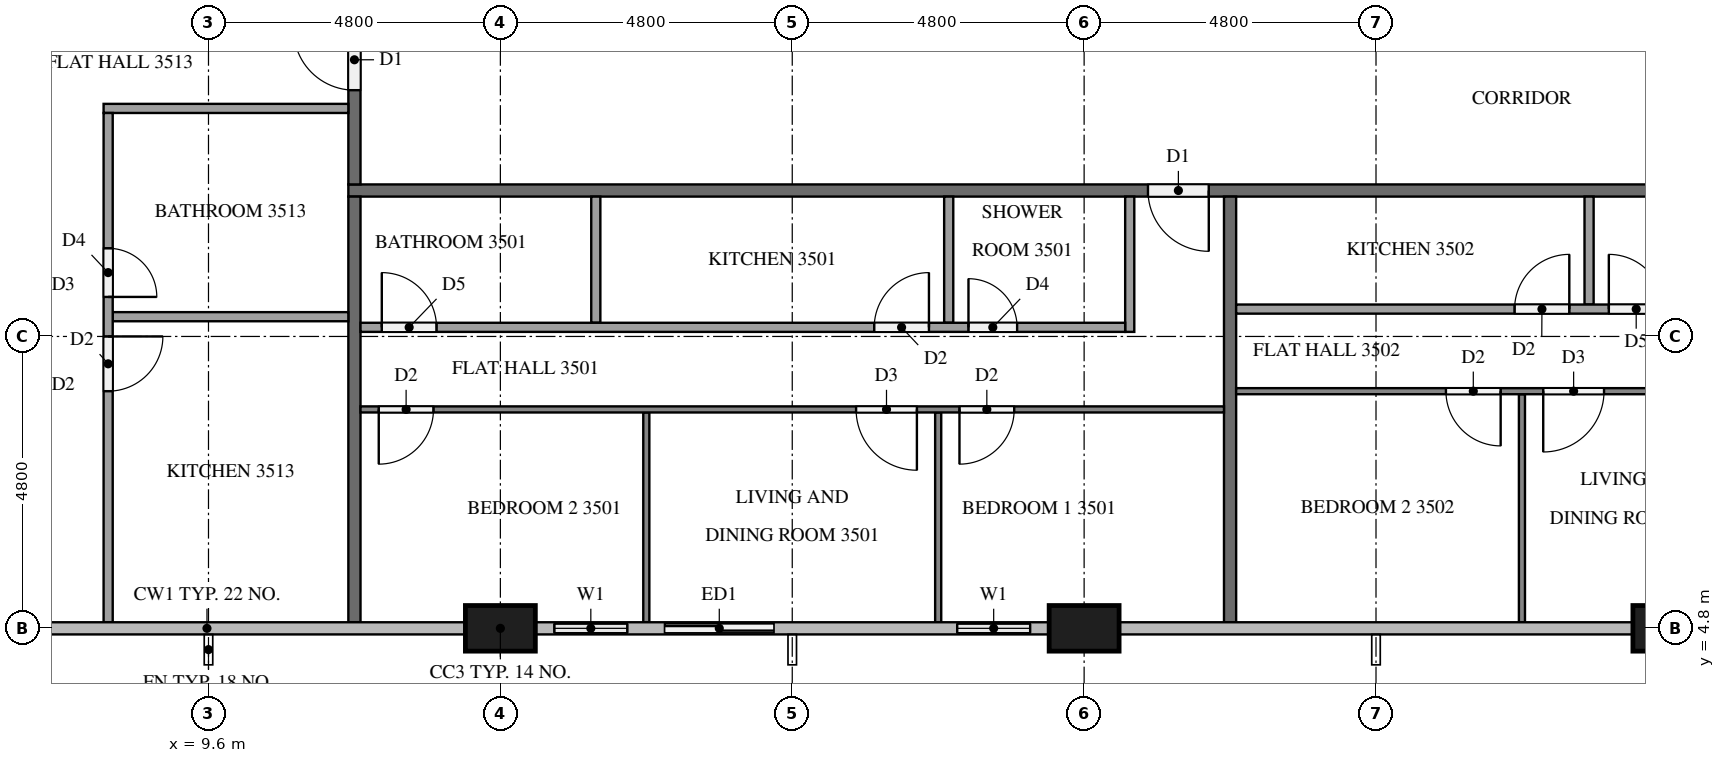
"""IFC4 building model, lengths in metres.
Left out: names, types, materials, properties, quantities, classifications, styles, units other than length and angle.
Written with IfcOpenShell. Run it as: python <this file> out.ifc"""

import sys

from ifc_helpers import new_model, si_unit, direction, frame, frame_2d, origin, origin_2d, place, context, subcontext, project, spatial, rectangle, extrude, element, fill, save


model = new_model("IFC4")
c1 = context("Model", 3, precision=1e-05, world=origin(), true_north=direction((0.0, 1.0)))
c2 = subcontext(c1, "Body", "Model", "MODEL_VIEW")
j1 = project(units=[si_unit("LENGTHUNIT", "METRE"), si_unit("PLANEANGLEUNIT", "RADIAN")], contexts=[c1])
p1 = place(None, origin())
s1 = spatial("IfcSite", under=j1, at=p1, CompositionType="ELEMENT")
p2 = place(p1, origin())
s2 = spatial("IfcBuilding", under=s1, at=p2, CompositionType="ELEMENT")
p3 = place(p2, frame((0.0, 0.0, 136.6)))
s3 = spatial("IfcBuildingStorey", under=s2, at=p3, CompositionType="ELEMENT", Elevation=136.6)
for number, where, z_axis, x_axis in (
    (1, (14.4, 4.8, 0.0), (0.0, 0.0, 1.0), (1.0, 0.0, 0.0)),
    (2, (24.0, 4.8, 0.0), (0.0, 0.0, 1.0), (1.0, 0.0, 0.0)),
    (3, (33.6, 4.8, 0.0), (0.0, 0.0, 1.0), (1.0, 0.0, 0.0)),
):
    element("IfcColumn", number, at=place(p3, frame(where, z_axis=z_axis, x_axis=x_axis)), inside=s3, PredefinedType="COLUMN", context=c2, shape_type="SweptSolid", body=[
        extrude(rectangle(XDim=1.15, YDim=0.75, at=origin_2d()), origin(), (0.0, 0.0, 1.0), 3.2),
    ])
p4 = place(p3, frame((14.975, 4.8, 0.0), z_axis=(0.0, 0.0, 1.0), x_axis=(1.0, 0.0, 0.0)))
e4 = element("IfcWall", 4, at=p4, inside=s3, PredefinedType="SOLIDWALL", context=c2, shape_type="SweptSolid", body=[
    extrude(rectangle(XDim=4.225, YDim=0.15, at=frame_2d((2.112, 0.0))), origin(), (0.0, 0.0, 1.0), 3.2),
])
p5 = place(p4, frame((0.312, 0.0, 0.9)))
e5 = element("IfcOpeningElement", 5, at=p5, cuts=e4, PredefinedType="OPENING", context=c2, shape_type="SweptSolid", body=[
    extrude(rectangle(XDim=1.2, YDim=1.4, at=frame_2d((0.6, 0.7))), frame((0.0, 0.085, 0.0), z_axis=(0.0, -1.0, 0.0), x_axis=(1.0, 0.0, 0.0)), (0.0, 0.0, 1.0), 0.17),
])
p6 = place(p4, frame((2.125, 0.0, 0.0)))
e6 = element("IfcOpeningElement", 6, at=p6, cuts=e4, PredefinedType="OPENING", context=c2, shape_type="SweptSolid", body=[
    extrude(rectangle(XDim=1.8, YDim=2.4, at=frame_2d((0.9, 1.2))), frame((0.0, 0.085, 0.0), z_axis=(0.0, -1.0, 0.0), x_axis=(1.0, 0.0, 0.0)), (0.0, 0.0, 1.0), 0.17),
])
p7 = place(p3, frame((21.6, 4.8, 0.0), z_axis=(0.0, 0.0, 1.0), x_axis=(1.0, 0.0, 0.0)))
e7 = element("IfcWall", 7, at=p7, inside=s3, PredefinedType="SOLIDWALL", context=c2, shape_type="SweptSolid", body=[
    extrude(rectangle(XDim=1.825, YDim=0.15, at=frame_2d((0.913, 0.0))), origin(), (0.0, 0.0, 1.0), 3.2),
])
p8 = place(p7, frame((0.312, 0.0, 0.9)))
e8 = element("IfcOpeningElement", 8, at=p8, cuts=e7, PredefinedType="OPENING", context=c2, shape_type="SweptSolid", body=[
    extrude(rectangle(XDim=1.2, YDim=1.4, at=frame_2d((0.6, 0.7))), frame((0.0, 0.085, 0.0), z_axis=(0.0, -1.0, 0.0), x_axis=(1.0, 0.0, 0.0)), (0.0, 0.0, 1.0), 0.17),
])
p9 = place(p3, frame((50.5, 12.0, 0.0), z_axis=(0.0, 0.0, 1.0), x_axis=(-1.0, 0.0, 0.0)))
e9 = element("IfcWall", 9, at=p9, inside=s3, PredefinedType="PARTITIONING", context=c2, shape_type="SweptSolid", body=[
    extrude(rectangle(XDim=38.6, YDim=0.2, at=frame_2d((19.3, 0.0))), origin(), (0.0, 0.0, 1.0), 3.2),
])
p10 = place(p9, frame((24.45, 0.0, 0.0)))
e10 = element("IfcOpeningElement", 10, at=p10, cuts=e9, PredefinedType="OPENING", context=c2, shape_type="SweptSolid", body=[
    extrude(rectangle(XDim=1.0, YDim=2.1, at=frame_2d((0.5, 1.05))), frame((0.0, 0.11, 0.0), z_axis=(0.0, -1.0, 0.0), x_axis=(1.0, 0.0, 0.0)), (0.0, 0.0, 1.0), 0.22),
])
p11 = place(p9, frame((10.05, 0.0, 0.0)))
e11 = element("IfcOpeningElement", 11, at=p11, cuts=e9, PredefinedType="OPENING", context=c2, shape_type="SweptSolid", body=[
    extrude(rectangle(XDim=1.0, YDim=2.1, at=frame_2d((0.5, 1.05))), frame((0.0, 0.11, 0.0), z_axis=(0.0, -1.0, 0.0), x_axis=(1.0, 0.0, 0.0)), (0.0, 0.0, 1.0), 0.22),
])
p12 = place(p9, frame((8.35, 0.0, 0.0)))
e12 = element("IfcOpeningElement", 12, at=p12, cuts=e9, PredefinedType="OPENING", context=c2, shape_type="SweptSolid", body=[
    extrude(rectangle(XDim=1.0, YDim=2.1, at=frame_2d((0.5, 1.05))), frame((0.0, 0.11, 0.0), z_axis=(0.0, -1.0, 0.0), x_axis=(1.0, 0.0, 0.0)), (0.0, 0.0, 1.0), 0.22),
])
p13 = place(p3, frame((12.0, 12.1, 0.0), z_axis=(0.0, 0.0, 1.0), x_axis=(0.0, 1.0, 0.0)))
e13 = element("IfcWall", 13, at=p13, inside=s3, PredefinedType="PARTITIONING", context=c2, shape_type="SweptSolid", body=[
    extrude(rectangle(XDim=2.8, YDim=0.2, at=frame_2d((1.4, 0.0))), origin(), (0.0, 0.0, 1.0), 3.2),
])
p14 = place(p13, frame((1.55, 0.0, 0.0)))
e14 = element("IfcOpeningElement", 14, at=p14, cuts=e13, PredefinedType="OPENING", context=c2, shape_type="SweptSolid", body=[
    extrude(rectangle(XDim=1.0, YDim=2.1, at=frame_2d((0.5, 1.05))), frame((0.0, 0.11, 0.0), z_axis=(0.0, -1.0, 0.0), x_axis=(1.0, 0.0, 0.0)), (0.0, 0.0, 1.0), 0.22),
])
for number, where, z_axis, x_axis in (
    (15, (26.4, 11.9, 0.0), (0.0, 0.0, 1.0), (0.0, -1.0, 0.0)),
    (16, (12.0, 4.9, 0.0), (0.0, 0.0, 1.0), (0.0, 1.0, 0.0)),
):
    element("IfcWall", number, at=place(p3, frame(where, z_axis=z_axis, x_axis=x_axis)), inside=s3, PredefinedType="PARTITIONING", context=c2, shape_type="SweptSolid", body=[
        extrude(rectangle(XDim=7.0, YDim=0.2, at=frame_2d((3.5, 0.0))), origin(), (0.0, 0.0, 1.0), 3.2),
    ])
for number, where, z_axis, x_axis in (
    (17, (21.6, 8.35, 0.0), (0.0, 0.0, 1.0), (0.0, -1.0, 0.0)),
    (18, (16.8, 8.35, 0.0), (0.0, 0.0, 1.0), (0.0, -1.0, 0.0)),
):
    element("IfcWall", number, at=place(p3, frame(where, z_axis=z_axis, x_axis=x_axis)), inside=s3, PredefinedType="PARTITIONING", context=c2, shape_type="SweptSolid", body=[
        extrude(rectangle(XDim=3.45, YDim=0.1, at=frame_2d((1.725, 0.0))), origin(), (0.0, 0.0, 1.0), 3.2),
    ])
p15 = place(p3, frame((26.3, 8.4, 0.0), z_axis=(0.0, 0.0, 1.0), x_axis=(-1.0, 0.0, 0.0)))
e19 = element("IfcWall", 19, at=p15, inside=s3, PredefinedType="PARTITIONING", context=c2, shape_type="SweptSolid", body=[
    extrude(rectangle(XDim=14.2, YDim=0.1, at=frame_2d((7.1, 0.0))), origin(), (0.0, 0.0, 1.0), 3.2),
])
p16 = place(p15, frame((3.45, 0.0, 0.0)))
e20 = element("IfcOpeningElement", 20, at=p16, cuts=e19, PredefinedType="OPENING", context=c2, shape_type="SweptSolid", body=[
    extrude(rectangle(XDim=0.9, YDim=2.1, at=frame_2d((0.45, 1.05))), frame((0.0, 0.06, 0.0), z_axis=(0.0, -1.0, 0.0), x_axis=(1.0, 0.0, 0.0)), (0.0, 0.0, 1.0), 0.12),
])
p17 = place(p15, frame((5.05, 0.0, 0.0)))
e21 = element("IfcOpeningElement", 21, at=p17, cuts=e19, PredefinedType="OPENING", context=c2, shape_type="SweptSolid", body=[
    extrude(rectangle(XDim=1.0, YDim=2.1, at=frame_2d((0.5, 1.05))), frame((0.0, 0.06, 0.0), z_axis=(0.0, -1.0, 0.0), x_axis=(1.0, 0.0, 0.0)), (0.0, 0.0, 1.0), 0.12),
])
p18 = place(p15, frame((13.0, 0.0, 0.0)))
e22 = element("IfcOpeningElement", 22, at=p18, cuts=e19, PredefinedType="OPENING", context=c2, shape_type="SweptSolid", body=[
    extrude(rectangle(XDim=0.9, YDim=2.1, at=frame_2d((0.45, 1.05))), frame((0.0, 0.06, 0.0), z_axis=(0.0, -1.0, 0.0), x_axis=(1.0, 0.0, 0.0)), (0.0, 0.0, 1.0), 0.12),
])
for number, where, z_axis, x_axis in (
    (23, (21.773, 11.9, 0.0), (0.0, 0.0, 1.0), (0.0, -1.0, 0.0)),
    (24, (15.969, 11.9, 0.0), (0.0, 0.0, 1.0), (0.0, -1.0, 0.0)),
):
    element("IfcWall", number, at=place(p3, frame(where, z_axis=z_axis, x_axis=x_axis)), inside=s3, PredefinedType="PARTITIONING", context=c2, shape_type="SweptSolid", body=[
        extrude(rectangle(XDim=2.075, YDim=0.15, at=frame_2d((1.038, 0.0))), origin(), (0.0, 0.0, 1.0), 3.2),
    ])
p19 = place(p3, frame((24.75, 11.9, 0.0), z_axis=(0.0, 0.0, 1.0), x_axis=(0.0, -1.0, 0.0)))
e25 = element("IfcWall", 25, at=p19, inside=s3, PredefinedType="PARTITIONING", context=c2, shape_type="SweptSolid", body=[
    extrude(rectangle(XDim=2.225, YDim=0.15, at=frame_2d((1.112, 0.0))), origin(), (0.0, 0.0, 1.0), 3.2),
])
p20 = place(p3, frame((12.1, 9.75, 0.0), z_axis=(0.0, 0.0, 1.0), x_axis=(1.0, 0.0, 0.0)))
e26 = element("IfcWall", 26, at=p20, inside=s3, PredefinedType="PARTITIONING", context=c2, shape_type="SweptSolid", body=[
    extrude(rectangle(XDim=12.575, YDim=0.15, at=frame_2d((6.288, 0.0))), origin(), (0.0, 0.0, 1.0), 3.2),
])
p21 = place(p20, frame((9.998, 0.0, 0.0)))
e27 = element("IfcOpeningElement", 27, at=p21, cuts=e26, PredefinedType="OPENING", context=c2, shape_type="SweptSolid", body=[
    extrude(rectangle(XDim=0.8, YDim=2.1, at=frame_2d((0.4, 1.05))), frame((0.0, 0.085, 0.0), z_axis=(0.0, -1.0, 0.0), x_axis=(1.0, 0.0, 0.0)), (0.0, 0.0, 1.0), 0.17),
])
p22 = place(p20, frame((8.448, 0.0, 0.0)))
e28 = element("IfcOpeningElement", 28, at=p22, cuts=e26, PredefinedType="OPENING", context=c2, shape_type="SweptSolid", body=[
    extrude(rectangle(XDim=0.9, YDim=2.1, at=frame_2d((0.45, 1.05))), frame((0.0, 0.085, 0.0), z_axis=(0.0, -1.0, 0.0), x_axis=(1.0, 0.0, 0.0)), (0.0, 0.0, 1.0), 0.17),
])
p23 = place(p20, frame((0.35, 0.0, 0.0)))
e29 = element("IfcOpeningElement", 29, at=p23, cuts=e26, PredefinedType="OPENING", context=c2, shape_type="SweptSolid", body=[
    extrude(rectangle(XDim=0.9, YDim=2.1, at=frame_2d((0.45, 1.05))), frame((0.0, 0.085, 0.0), z_axis=(0.0, -1.0, 0.0), x_axis=(1.0, 0.0, 0.0)), (0.0, 0.0, 1.0), 0.17),
])
p24 = place(p3, frame((31.2, 8.65, 0.0), z_axis=(0.0, 0.0, 1.0), x_axis=(0.0, -1.0, 0.0)))
e30 = element("IfcWall", 30, at=p24, inside=s3, PredefinedType="PARTITIONING", context=c2, shape_type="SweptSolid", body=[
    extrude(rectangle(XDim=3.75, YDim=0.1, at=frame_2d((1.875, 0.0))), origin(), (0.0, 0.0, 1.0), 3.2),
])
p25 = place(p3, frame((40.7, 8.7, 0.0), z_axis=(0.0, 0.0, 1.0), x_axis=(-1.0, 0.0, 0.0)))
e31 = element("IfcWall", 31, at=p25, inside=s3, PredefinedType="PARTITIONING", context=c2, shape_type="SweptSolid", body=[
    extrude(rectangle(XDim=14.2, YDim=0.1, at=frame_2d((7.1, 0.0))), origin(), (0.0, 0.0, 1.0), 3.2),
])
p26 = place(p25, frame((0.3, 0.0, 0.0)))
e32 = element("IfcOpeningElement", 32, at=p26, cuts=e31, PredefinedType="OPENING", context=c2, shape_type="SweptSolid", body=[
    extrude(rectangle(XDim=0.9, YDim=2.1, at=frame_2d((0.45, 1.05))), frame((0.0, 0.06, 0.0), z_axis=(0.0, -1.0, 0.0), x_axis=(1.0, 0.0, 0.0)), (0.0, 0.0, 1.0), 0.12),
])
p27 = place(p25, frame((8.15, 0.0, 0.0)))
e33 = element("IfcOpeningElement", 33, at=p27, cuts=e31, PredefinedType="OPENING", context=c2, shape_type="SweptSolid", body=[
    extrude(rectangle(XDim=1.0, YDim=2.1, at=frame_2d((0.5, 1.05))), frame((0.0, 0.06, 0.0), z_axis=(0.0, -1.0, 0.0), x_axis=(1.0, 0.0, 0.0)), (0.0, 0.0, 1.0), 0.12),
])
p28 = place(p25, frame((9.85, 0.0, 0.0)))
e34 = element("IfcOpeningElement", 34, at=p28, cuts=e31, PredefinedType="OPENING", context=c2, shape_type="SweptSolid", body=[
    extrude(rectangle(XDim=0.9, YDim=2.1, at=frame_2d((0.45, 1.05))), frame((0.0, 0.06, 0.0), z_axis=(0.0, -1.0, 0.0), x_axis=(1.0, 0.0, 0.0)), (0.0, 0.0, 1.0), 0.12),
])
p29 = place(p3, frame((32.304, 11.9, 0.0), z_axis=(0.0, 0.0, 1.0), x_axis=(0.0, -1.0, 0.0)))
e35 = element("IfcWall", 35, at=p29, inside=s3, PredefinedType="PARTITIONING", context=c2, shape_type="SweptSolid", body=[
    extrude(rectangle(XDim=1.775, YDim=0.15, at=frame_2d((0.887, 0.0))), origin(), (0.0, 0.0, 1.0), 3.2),
])
p30 = place(p3, frame((26.5, 10.05, 0.0), z_axis=(0.0, 0.0, 1.0), x_axis=(1.0, 0.0, 0.0)))
e36 = element("IfcWall", 36, at=p30, inside=s3, PredefinedType="PARTITIONING", context=c2, shape_type="SweptSolid", body=[
    extrude(rectangle(XDim=12.575, YDim=0.15, at=frame_2d((6.288, 0.0))), origin(), (0.0, 0.0, 1.0), 3.2),
])
p31 = place(p30, frame((11.475, 0.0, 0.0)))
e37 = element("IfcOpeningElement", 37, at=p31, cuts=e36, PredefinedType="OPENING", context=c2, shape_type="SweptSolid", body=[
    extrude(rectangle(XDim=0.8, YDim=2.1, at=frame_2d((0.4, 1.05))), frame((0.0, 0.085, 0.0), z_axis=(0.0, -1.0, 0.0), x_axis=(1.0, 0.0, 0.0)), (0.0, 0.0, 1.0), 0.17),
])
p32 = place(p30, frame((6.129, 0.0, 0.0)))
e38 = element("IfcOpeningElement", 38, at=p32, cuts=e36, PredefinedType="OPENING", context=c2, shape_type="SweptSolid", body=[
    extrude(rectangle(XDim=0.9, YDim=2.1, at=frame_2d((0.45, 1.05))), frame((0.0, 0.085, 0.0), z_axis=(0.0, -1.0, 0.0), x_axis=(1.0, 0.0, 0.0)), (0.0, 0.0, 1.0), 0.17),
])
p33 = place(p30, frame((4.579, 0.0, 0.0)))
e39 = element("IfcOpeningElement", 39, at=p33, cuts=e36, PredefinedType="OPENING", context=c2, shape_type="SweptSolid", body=[
    extrude(rectangle(XDim=0.9, YDim=2.1, at=frame_2d((0.45, 1.05))), frame((0.0, 0.085, 0.0), z_axis=(0.0, -1.0, 0.0), x_axis=(1.0, 0.0, 0.0)), (0.0, 0.0, 1.0), 0.17),
])
p34 = place(p3, frame((11.9, 9.925, 0.0), z_axis=(0.0, 0.0, 1.0), x_axis=(-1.0, 0.0, 0.0)))
e40 = element("IfcWall", 40, at=p34, inside=s3, PredefinedType="PARTITIONING", context=c2, shape_type="SweptSolid", body=[
    extrude(rectangle(XDim=3.875, YDim=0.15, at=frame_2d((1.938, 0.0))), origin(), (0.0, 0.0, 1.0), 3.2),
])
p35 = place(p3, frame((11.9, 13.35, 0.0), z_axis=(0.0, 0.0, 1.0), x_axis=(-1.0, 0.0, 0.0)))
e41 = element("IfcWall", 41, at=p35, inside=s3, PredefinedType="PARTITIONING", context=c2, shape_type="SweptSolid", body=[
    extrude(rectangle(XDim=4.025, YDim=0.15, at=frame_2d((2.012, 0.0))), origin(), (0.0, 0.0, 1.0), 3.2),
])
p36 = place(p3, frame((7.95, 13.275, 0.0), z_axis=(0.0, 0.0, 1.0), x_axis=(0.0, -1.0, 0.0)))
e42 = element("IfcWall", 42, at=p36, inside=s3, PredefinedType="PARTITIONING", context=c2, shape_type="SweptSolid", body=[
    extrude(rectangle(XDim=8.375, YDim=0.15, at=frame_2d((4.188, 0.0))), origin(), (0.0, 0.0, 1.0), 3.2),
])
p37 = place(p36, frame((2.225, 0.0, 0.0)))
e43 = element("IfcOpeningElement", 43, at=p37, cuts=e42, PredefinedType="OPENING", context=c2, shape_type="SweptSolid", body=[
    extrude(rectangle(XDim=0.8, YDim=2.1, at=frame_2d((0.4, 1.05))), frame((0.0, 0.085, 0.0), z_axis=(0.0, -1.0, 0.0), x_axis=(1.0, 0.0, 0.0)), (0.0, 0.0, 1.0), 0.17),
])
p38 = place(p36, frame((3.675, 0.0, 0.0)))
e44 = element("IfcOpeningElement", 44, at=p38, cuts=e42, PredefinedType="OPENING", context=c2, shape_type="SweptSolid", body=[
    extrude(rectangle(XDim=0.9, YDim=2.1, at=frame_2d((0.45, 1.05))), frame((0.0, 0.085, 0.0), z_axis=(0.0, -1.0, 0.0), x_axis=(1.0, 0.0, 0.0)), (0.0, 0.0, 1.0), 0.17),
])
p39 = place(p5, origin())
e45 = element("IfcWindow", 45, at=p39, inside=s3, PartitioningType="SINGLE_PANEL", PredefinedType="WINDOW", context=c2, shape_type="SweptSolid", body=[
    extrude(rectangle(XDim=1.2, YDim=1.4, at=frame_2d((0.6, 0.7))), frame((0.0, 0.03, 0.0), z_axis=(0.0, -1.0, 0.0), x_axis=(1.0, 0.0, 0.0)), (0.0, 0.0, 1.0), 0.06),
])
fill(e5, e45)
p40 = place(p6, origin())
e46 = element("IfcDoor", 46, at=p40, inside=s3, OperationType="SLIDING_TO_LEFT", PredefinedType="DOOR", context=c2, shape_type="SweptSolid", body=[
    extrude(rectangle(XDim=1.8, YDim=2.4, at=frame_2d((0.9, 1.2))), frame((0.0, 0.025, 0.0), z_axis=(0.0, -1.0, 0.0), x_axis=(1.0, 0.0, 0.0)), (0.0, 0.0, 1.0), 0.05),
])
fill(e6, e46)
p41 = place(p8, origin())
e47 = element("IfcWindow", 47, at=p41, inside=s3, PartitioningType="SINGLE_PANEL", PredefinedType="WINDOW", context=c2, shape_type="SweptSolid", body=[
    extrude(rectangle(XDim=1.2, YDim=1.4, at=frame_2d((0.6, 0.7))), frame((0.0, 0.03, 0.0), z_axis=(0.0, -1.0, 0.0), x_axis=(1.0, 0.0, 0.0)), (0.0, 0.0, 1.0), 0.06),
])
fill(e8, e47)
p42 = place(p10, origin())
e48 = element("IfcDoor", 48, at=p42, inside=s3, OperationType="SINGLE_SWING_LEFT", PredefinedType="DOOR", context=c2, shape_type="SweptSolid", body=[
    extrude(rectangle(XDim=1.0, YDim=2.1, at=frame_2d((0.5, 1.05))), frame((0.0, 0.025, 0.0), z_axis=(0.0, -1.0, 0.0), x_axis=(1.0, 0.0, 0.0)), (0.0, 0.0, 1.0), 0.05),
])
fill(e10, e48)
p43 = place(p14, origin())
e49 = element("IfcDoor", 49, at=p43, inside=s3, OperationType="SINGLE_SWING_RIGHT", PredefinedType="DOOR", context=c2, shape_type="SweptSolid", body=[
    extrude(rectangle(XDim=1.0, YDim=2.1, at=frame_2d((0.5, 1.05))), frame((0.0, 0.025, 0.0), z_axis=(0.0, -1.0, 0.0), x_axis=(1.0, 0.0, 0.0)), (0.0, 0.0, 1.0), 0.05),
])
fill(e14, e49)
p44 = place(p16, origin())
e50 = element("IfcDoor", 50, at=p44, inside=s3, OperationType="SINGLE_SWING_RIGHT", PredefinedType="DOOR", context=c2, shape_type="SweptSolid", body=[
    extrude(rectangle(XDim=0.9, YDim=2.1, at=frame_2d((0.45, 1.05))), frame((0.0, 0.025, 0.0), z_axis=(0.0, -1.0, 0.0), x_axis=(1.0, 0.0, 0.0)), (0.0, 0.0, 1.0), 0.05),
])
fill(e20, e50)
p45 = place(p17, origin())
e51 = element("IfcDoor", 51, at=p45, inside=s3, OperationType="SINGLE_SWING_LEFT", PredefinedType="DOOR", context=c2, shape_type="SweptSolid", body=[
    extrude(rectangle(XDim=1.0, YDim=2.1, at=frame_2d((0.5, 1.05))), frame((0.0, 0.025, 0.0), z_axis=(0.0, -1.0, 0.0), x_axis=(1.0, 0.0, 0.0)), (0.0, 0.0, 1.0), 0.05),
])
fill(e21, e51)
p46 = place(p18, origin())
e52 = element("IfcDoor", 52, at=p46, inside=s3, OperationType="SINGLE_SWING_RIGHT", PredefinedType="DOOR", context=c2, shape_type="SweptSolid", body=[
    extrude(rectangle(XDim=0.9, YDim=2.1, at=frame_2d((0.45, 1.05))), frame((0.0, 0.025, 0.0), z_axis=(0.0, -1.0, 0.0), x_axis=(1.0, 0.0, 0.0)), (0.0, 0.0, 1.0), 0.05),
])
fill(e22, e52)
p47 = place(p21, origin())
e53 = element("IfcDoor", 53, at=p47, inside=s3, OperationType="SINGLE_SWING_LEFT", PredefinedType="DOOR", context=c2, shape_type="SweptSolid", body=[
    extrude(rectangle(XDim=0.8, YDim=2.1, at=frame_2d((0.4, 1.05))), frame((0.0, 0.025, 0.0), z_axis=(0.0, -1.0, 0.0), x_axis=(1.0, 0.0, 0.0)), (0.0, 0.0, 1.0), 0.05),
])
fill(e27, e53)
p48 = place(p22, origin())
e54 = element("IfcDoor", 54, at=p48, inside=s3, OperationType="SINGLE_SWING_RIGHT", PredefinedType="DOOR", context=c2, shape_type="SweptSolid", body=[
    extrude(rectangle(XDim=0.9, YDim=2.1, at=frame_2d((0.45, 1.05))), frame((0.0, 0.025, 0.0), z_axis=(0.0, -1.0, 0.0), x_axis=(1.0, 0.0, 0.0)), (0.0, 0.0, 1.0), 0.05),
])
fill(e28, e54)
p49 = place(p23, origin())
e55 = element("IfcDoor", 55, at=p49, inside=s3, OperationType="SINGLE_SWING_LEFT", PredefinedType="DOOR", context=c2, shape_type="SweptSolid", body=[
    extrude(rectangle(XDim=0.9, YDim=2.1, at=frame_2d((0.45, 1.05))), frame((0.0, 0.025, 0.0), z_axis=(0.0, -1.0, 0.0), x_axis=(1.0, 0.0, 0.0)), (0.0, 0.0, 1.0), 0.05),
])
fill(e29, e55)
p50 = place(p27, origin())
e56 = element("IfcDoor", 56, at=p50, inside=s3, OperationType="SINGLE_SWING_RIGHT", PredefinedType="DOOR", context=c2, shape_type="SweptSolid", body=[
    extrude(rectangle(XDim=1.0, YDim=2.1, at=frame_2d((0.5, 1.05))), frame((0.0, 0.025, 0.0), z_axis=(0.0, -1.0, 0.0), x_axis=(1.0, 0.0, 0.0)), (0.0, 0.0, 1.0), 0.05),
])
fill(e33, e56)
p51 = place(p28, origin())
e57 = element("IfcDoor", 57, at=p51, inside=s3, OperationType="SINGLE_SWING_LEFT", PredefinedType="DOOR", context=c2, shape_type="SweptSolid", body=[
    extrude(rectangle(XDim=0.9, YDim=2.1, at=frame_2d((0.45, 1.05))), frame((0.0, 0.025, 0.0), z_axis=(0.0, -1.0, 0.0), x_axis=(1.0, 0.0, 0.0)), (0.0, 0.0, 1.0), 0.05),
])
fill(e34, e57)
p52 = place(p32, origin())
e58 = element("IfcDoor", 58, at=p52, inside=s3, OperationType="SINGLE_SWING_LEFT", PredefinedType="DOOR", context=c2, shape_type="SweptSolid", body=[
    extrude(rectangle(XDim=0.9, YDim=2.1, at=frame_2d((0.45, 1.05))), frame((0.0, 0.025, 0.0), z_axis=(0.0, -1.0, 0.0), x_axis=(1.0, 0.0, 0.0)), (0.0, 0.0, 1.0), 0.05),
])
fill(e38, e58)
p53 = place(p33, origin())
e59 = element("IfcDoor", 59, at=p53, inside=s3, OperationType="SINGLE_SWING_RIGHT", PredefinedType="DOOR", context=c2, shape_type="SweptSolid", body=[
    extrude(rectangle(XDim=0.9, YDim=2.1, at=frame_2d((0.45, 1.05))), frame((0.0, 0.025, 0.0), z_axis=(0.0, -1.0, 0.0), x_axis=(1.0, 0.0, 0.0)), (0.0, 0.0, 1.0), 0.05),
])
fill(e39, e59)
p54 = place(p37, origin())
e60 = element("IfcDoor", 60, at=p54, inside=s3, OperationType="SINGLE_SWING_RIGHT", PredefinedType="DOOR", context=c2, shape_type="SweptSolid", body=[
    extrude(rectangle(XDim=0.8, YDim=2.1, at=frame_2d((0.4, 1.05))), frame((0.0, 0.025, 0.0), z_axis=(0.0, -1.0, 0.0), x_axis=(1.0, 0.0, 0.0)), (0.0, 0.0, 1.0), 0.05),
])
fill(e43, e60)
p55 = place(p38, origin())
e61 = element("IfcDoor", 61, at=p55, inside=s3, OperationType="SINGLE_SWING_LEFT", PredefinedType="DOOR", context=c2, shape_type="SweptSolid", body=[
    extrude(rectangle(XDim=0.9, YDim=2.1, at=frame_2d((0.45, 1.05))), frame((0.0, 0.025, 0.0), z_axis=(0.0, -1.0, 0.0), x_axis=(1.0, 0.0, 0.0)), (0.0, 0.0, 1.0), 0.05),
])
fill(e44, e61)
save(model, sys.argv[1])
